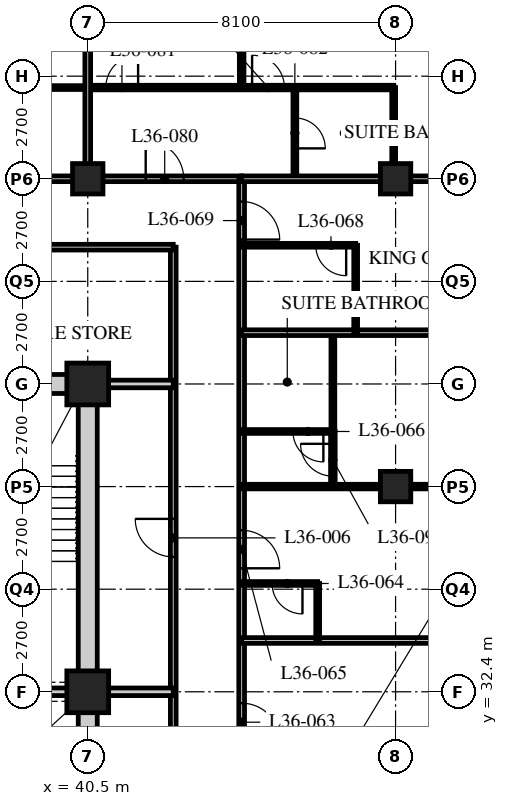
"""IFC4 building model, lengths in metres.
Left out: names, types, materials, properties, quantities, classifications, styles, units other than length and angle.
Written with IfcOpenShell. Run it as: python <this file> out.ifc"""

import sys

from ifc_helpers import new_model, si_unit, direction, frame, frame_2d, origin, origin_2d, place, context, subcontext, project, spatial, rectangle, hollow_rectangle, extrude, element, fill, save


model = new_model("IFC4")
c1 = context("Model", 3, precision=1e-05, world=origin(), true_north=direction((0.0, 1.0)))
c2 = subcontext(c1, "Body", "Model", "MODEL_VIEW")
j1 = project(units=[si_unit("LENGTHUNIT", "METRE"), si_unit("PLANEANGLEUNIT", "RADIAN")], contexts=[c1])
p1 = place(None, origin())
s1 = spatial("IfcSite", under=j1, at=p1, CompositionType="ELEMENT")
p2 = place(p1, origin())
s2 = spatial("IfcBuilding", under=s1, at=p2, CompositionType="ELEMENT")
p3 = place(p2, frame((0.0, 0.0, 140.8)))
s3 = spatial("IfcBuildingStorey", under=s2, at=p3, CompositionType="ELEMENT", Elevation=140.8)
for number, where, z_axis, x_axis in (
    (1, (40.5, 32.4, 0.0), (0.0, 0.0, 1.0), (1.0, 0.0, 0.0)),
    (2, (40.5, 40.5, 0.0), (0.0, 0.0, 1.0), (1.0, 0.0, 0.0)),
):
    element("IfcColumn", number, at=place(p3, frame(where, z_axis=z_axis, x_axis=x_axis)), inside=s3, PredefinedType="COLUMN", context=c2, shape_type="SweptSolid", body=[
        extrude(hollow_rectangle(XDim=1.1, YDim=1.1, WallThickness=0.1, at=origin_2d()), origin(), (0.0, 0.0, 1.0), 3.4),
    ])
for number, where, z_axis, x_axis in (
    (3, (40.5, 45.9, 0.0), (0.0, 0.0, 1.0), (1.0, 0.0, 0.0)),
    (4, (48.6, 37.8, 0.0), (0.0, 0.0, 1.0), (1.0, 0.0, 0.0)),
    (5, (48.6, 45.9, 0.0), (0.0, 0.0, 1.0), (1.0, 0.0, 0.0)),
):
    element("IfcColumn", number, at=place(p3, frame(where, z_axis=z_axis, x_axis=x_axis)), inside=s3, PredefinedType="COLUMN", context=c2, shape_type="SweptSolid", body=[
        extrude(hollow_rectangle(XDim=0.8, YDim=0.8, WallThickness=0.08, at=origin_2d()), origin(), (0.0, 0.0, 1.0), 3.4),
    ])
p4 = place(p3, frame((8.1, 45.9, 0.0), z_axis=(0.0, 0.0, 1.0), x_axis=(1.0, 0.0, 0.0)))
e6 = element("IfcWall", 6, at=p4, inside=s3, PredefinedType="PARTITIONING", context=c2, shape_type="SweptSolid", body=[
    extrude(rectangle(XDim=36.45, YDim=0.15, at=frame_2d((18.225, 0.0))), origin(), (0.0, 0.0, 1.0), 2.578),
])
p5 = place(p4, frame((9.625, 0.0, 0.0)))
e7 = element("IfcOpeningElement", 7, at=p5, cuts=e6, PredefinedType="OPENING", context=c2, shape_type="SweptSolid", body=[
    extrude(rectangle(XDim=1.0, YDim=2.1, at=frame_2d((0.5, 1.05))), frame((0.0, 0.085, 0.0), z_axis=(0.0, -1.0, 0.0), x_axis=(1.0, 0.0, 0.0)), (0.0, 0.0, 1.0), 0.17),
])
p6 = place(p4, frame((21.775, 0.0, 0.0)))
e8 = element("IfcOpeningElement", 8, at=p6, cuts=e6, PredefinedType="OPENING", context=c2, shape_type="SweptSolid", body=[
    extrude(rectangle(XDim=1.0, YDim=2.1, at=frame_2d((0.5, 1.05))), frame((0.0, 0.085, 0.0), z_axis=(0.0, -1.0, 0.0), x_axis=(1.0, 0.0, 0.0)), (0.0, 0.0, 1.0), 0.17),
])
p7 = place(p4, frame((28.95, 0.0, 0.0)))
e9 = element("IfcOpeningElement", 9, at=p7, cuts=e6, PredefinedType="OPENING", context=c2, shape_type="SweptSolid", body=[
    extrude(rectangle(XDim=1.0, YDim=2.1, at=frame_2d((0.5, 1.05))), frame((0.0, 0.085, 0.0), z_axis=(0.0, -1.0, 0.0), x_axis=(1.0, 0.0, 0.0)), (0.0, 0.0, 1.0), 0.17),
])
p8 = place(p4, frame((33.925, 0.0, 0.0)))
e10 = element("IfcOpeningElement", 10, at=p8, cuts=e6, PredefinedType="OPENING", context=c2, shape_type="SweptSolid", body=[
    extrude(rectangle(XDim=1.0, YDim=2.1, at=frame_2d((0.5, 1.05))), frame((0.0, 0.085, 0.0), z_axis=(0.0, -1.0, 0.0), x_axis=(1.0, 0.0, 0.0)), (0.0, 0.0, 1.0), 0.17),
])
p9 = place(p4, frame((2.625, 0.0, 0.0)))
e11 = element("IfcOpeningElement", 11, at=p9, cuts=e6, PredefinedType="OPENING", context=c2, shape_type="SweptSolid", body=[
    extrude(rectangle(XDim=1.0, YDim=2.1, at=frame_2d((0.5, 1.05))), frame((0.0, 0.085, 0.0), z_axis=(0.0, -1.0, 0.0), x_axis=(1.0, 0.0, 0.0)), (0.0, 0.0, 1.0), 0.17),
])
p10 = place(p3, frame((44.55, 17.55, 0.0), z_axis=(0.0, 0.0, 1.0), x_axis=(0.0, 1.0, 0.0)))
e12 = element("IfcWall", 12, at=p10, inside=s3, PredefinedType="PARTITIONING", context=c2, shape_type="SweptSolid", body=[
    extrude(rectangle(XDim=28.35, YDim=0.15, at=frame_2d((14.175, 0.0))), origin(), (0.0, 0.0, 1.0), 3.19),
])
p11 = place(p10, frame((2.75, 0.0, 0.0)))
e13 = element("IfcOpeningElement", 13, at=p11, cuts=e12, PredefinedType="OPENING", context=c2, shape_type="SweptSolid", body=[
    extrude(rectangle(XDim=1.0, YDim=2.1, at=frame_2d((0.5, 1.05))), frame((0.0, 0.085, 0.0), z_axis=(0.0, -1.0, 0.0), x_axis=(1.0, 0.0, 0.0)), (0.0, 0.0, 1.0), 0.17),
])
p12 = place(p10, frame((6.5, 0.0, 0.0)))
e14 = element("IfcOpeningElement", 14, at=p12, cuts=e12, PredefinedType="OPENING", context=c2, shape_type="SweptSolid", body=[
    extrude(rectangle(XDim=1.0, YDim=2.1, at=frame_2d((0.5, 1.05))), frame((0.0, 0.085, 0.0), z_axis=(0.0, -1.0, 0.0), x_axis=(1.0, 0.0, 0.0)), (0.0, 0.0, 1.0), 0.17),
])
p13 = place(p10, frame((13.55, 0.0, 0.0)))
e15 = element("IfcOpeningElement", 15, at=p13, cuts=e12, PredefinedType="OPENING", context=c2, shape_type="SweptSolid", body=[
    extrude(rectangle(XDim=1.0, YDim=2.1, at=frame_2d((0.5, 1.05))), frame((0.0, 0.085, 0.0), z_axis=(0.0, -1.0, 0.0), x_axis=(1.0, 0.0, 0.0)), (0.0, 0.0, 1.0), 0.17),
])
p14 = place(p10, frame((18.1, 0.0, 0.0)))
e16 = element("IfcOpeningElement", 16, at=p14, cuts=e12, PredefinedType="OPENING", context=c2, shape_type="SweptSolid", body=[
    extrude(rectangle(XDim=1.0, YDim=2.1, at=frame_2d((0.5, 1.05))), frame((0.0, 0.085, 0.0), z_axis=(0.0, -1.0, 0.0), x_axis=(1.0, 0.0, 0.0)), (0.0, 0.0, 1.0), 0.17),
])
p15 = place(p10, frame((26.75, 0.0, 0.0)))
e17 = element("IfcOpeningElement", 17, at=p15, cuts=e12, PredefinedType="OPENING", context=c2, shape_type="SweptSolid", body=[
    extrude(rectangle(XDim=1.0, YDim=2.1, at=frame_2d((0.5, 1.05))), frame((0.0, 0.085, 0.0), z_axis=(0.0, -1.0, 0.0), x_axis=(1.0, 0.0, 0.0)), (0.0, 0.0, 1.0), 0.17),
])
p16 = place(p3, frame((42.75, 19.35, 0.0), z_axis=(0.0, 0.0, 1.0), x_axis=(0.0, 1.0, 0.0)))
e18 = element("IfcWall", 18, at=p16, inside=s3, PredefinedType="PARTITIONING", context=c2, shape_type="SweptSolid", body=[
    extrude(rectangle(XDim=24.75, YDim=0.15, at=frame_2d((12.375, 0.0))), origin(), (0.0, 0.0, 1.0), 3.19),
])
p17 = place(p16, frame((8.5, 0.0, 0.0)))
e19 = element("IfcOpeningElement", 19, at=p17, cuts=e18, PredefinedType="OPENING", context=c2, shape_type="SweptSolid", body=[
    extrude(rectangle(XDim=1.0, YDim=2.1, at=frame_2d((0.5, 1.05))), frame((0.0, 0.085, 0.0), z_axis=(0.0, -1.0, 0.0), x_axis=(1.0, 0.0, 0.0)), (0.0, 0.0, 1.0), 0.17),
])
p18 = place(p16, frame((16.6, 0.0, 0.0)))
e20 = element("IfcOpeningElement", 20, at=p18, cuts=e18, PredefinedType="OPENING", context=c2, shape_type="SweptSolid", body=[
    extrude(rectangle(XDim=1.0, YDim=2.1, at=frame_2d((0.5, 1.05))), frame((0.0, 0.085, 0.0), z_axis=(0.0, -1.0, 0.0), x_axis=(1.0, 0.0, 0.0)), (0.0, 0.0, 1.0), 0.17),
])
p19 = place(p3, frame((42.75, 44.1, 0.0), z_axis=(0.0, 0.0, 1.0), x_axis=(-1.0, 0.0, 0.0)))
e21 = element("IfcWall", 21, at=p19, inside=s3, PredefinedType="PARTITIONING", context=c2, shape_type="SweptSolid", body=[
    extrude(rectangle(XDim=13.19, YDim=0.15, at=frame_2d((6.595, 0.0))), origin(), (0.0, 0.0, 1.0), 3.19),
])
p20 = place(p19, frame((10.2, 0.0, 0.0)))
e22 = element("IfcOpeningElement", 22, at=p20, cuts=e21, PredefinedType="OPENING", context=c2, shape_type="SweptSolid", body=[
    extrude(rectangle(XDim=1.0, YDim=2.1, at=frame_2d((0.5, 1.05))), frame((0.0, 0.085, 0.0), z_axis=(0.0, -1.0, 0.0), x_axis=(1.0, 0.0, 0.0)), (0.0, 0.0, 1.0), 0.17),
])
p21 = place(p19, frame((3.6, 0.0, 0.0)))
e23 = element("IfcOpeningElement", 23, at=p21, cuts=e21, PredefinedType="OPENING", context=c2, shape_type="SweptSolid", body=[
    extrude(rectangle(XDim=1.0, YDim=2.1, at=frame_2d((0.5, 1.05))), frame((0.0, 0.085, 0.0), z_axis=(0.0, -1.0, 0.0), x_axis=(1.0, 0.0, 0.0)), (0.0, 0.0, 1.0), 0.17),
])
for number, where, z_axis, x_axis in (
    (24, (40.5, 32.4, 0.0), (0.0, 0.0, 1.0), (1.0, 0.0, 0.0)),
    (25, (40.5, 40.5, 0.0), (0.0, 0.0, 1.0), (1.0, 0.0, 0.0)),
):
    element("IfcWall", number, at=place(p3, frame(where, z_axis=z_axis, x_axis=x_axis)), inside=s3, PredefinedType="SOLIDWALL", context=c2, shape_type="SweptSolid", body=[
        extrude(rectangle(XDim=2.25, YDim=0.2, at=frame_2d((1.125, 0.0))), origin(), (0.0, 0.0, 1.0), 3.19),
    ])
p22 = place(p3, frame((38.2, 48.3, 0.0), z_axis=(0.0, 0.0, 1.0), x_axis=(1.0, 0.0, 0.0)))
e26 = element("IfcWall", 26, at=p22, inside=s3, PredefinedType="PARTITIONING", context=c2, shape_type="SweptSolid", body=[
    extrude(rectangle(XDim=2.3, YDim=0.1, at=frame_2d((1.15, 0.0))), origin(), (0.0, 0.0, 1.0), 3.19),
])
p23 = place(p3, frame((44.55, 33.75, 0.0), z_axis=(0.0, 0.0, 1.0), x_axis=(1.0, 0.0, 0.0)))
e27 = element("IfcWall", 27, at=p23, inside=s3, PredefinedType="PARTITIONING", context=c2, shape_type="SweptSolid", body=[
    extrude(rectangle(XDim=11.85, YDim=0.15, at=frame_2d((5.925, 0.0))), origin(), (0.0, 0.0, 1.0), 3.19),
])
p24 = place(p3, frame((46.55, 33.75, 0.0), z_axis=(0.0, 0.0, 1.0), x_axis=(0.0, 1.0, 0.0)))
e28 = element("IfcWall", 28, at=p24, inside=s3, PredefinedType="PARTITIONING", context=c2, shape_type="SweptSolid", body=[
    extrude(rectangle(XDim=1.5, YDim=0.1, at=frame_2d((0.75, 0.0))), origin(), (0.0, 0.0, 1.0), 3.19),
])
p25 = place(p3, frame((44.55, 35.25, 0.0), z_axis=(0.0, 0.0, 1.0), x_axis=(1.0, 0.0, 0.0)))
e29 = element("IfcWall", 29, at=p25, inside=s3, PredefinedType="PARTITIONING", context=c2, shape_type="SweptSolid", body=[
    extrude(rectangle(XDim=2.0, YDim=0.1, at=frame_2d((1.0, 0.0))), origin(), (0.0, 0.0, 1.0), 3.19),
])
p26 = place(p25, frame((0.8, 0.0, 0.0)))
e30 = element("IfcOpeningElement", 30, at=p26, cuts=e29, PredefinedType="OPENING", context=c2, shape_type="SweptSolid", body=[
    extrude(rectangle(XDim=0.8, YDim=2.1, at=frame_2d((0.4, 1.05))), frame((0.0, 0.06, 0.0), z_axis=(0.0, -1.0, 0.0), x_axis=(1.0, 0.0, 0.0)), (0.0, 0.0, 1.0), 0.12),
])
p27 = place(p3, frame((46.95, 39.25, 0.0), z_axis=(0.0, 0.0, 1.0), x_axis=(0.0, 1.0, 0.0)))
e31 = element("IfcWall", 31, at=p27, inside=s3, PredefinedType="PARTITIONING", context=c2, shape_type="SweptSolid", body=[
    extrude(rectangle(XDim=2.6, YDim=0.1, at=frame_2d((1.3, 0.0))), origin(), (0.0, 0.0, 1.0), 3.19),
])
p28 = place(p3, frame((44.55, 39.25, 0.0), z_axis=(0.0, 0.0, 1.0), x_axis=(1.0, 0.0, 0.0)))
e32 = element("IfcWall", 32, at=p28, inside=s3, PredefinedType="PARTITIONING", context=c2, shape_type="SweptSolid", body=[
    extrude(rectangle(XDim=2.4, YDim=0.1, at=frame_2d((1.2, 0.0))), origin(), (0.0, 0.0, 1.0), 3.19),
])
p29 = place(p28, frame((1.35, 0.0, 0.0)))
e33 = element("IfcOpeningElement", 33, at=p29, cuts=e32, PredefinedType="OPENING", context=c2, shape_type="SweptSolid", body=[
    extrude(rectangle(XDim=0.8, YDim=2.1, at=frame_2d((0.4, 1.05))), frame((0.0, 0.06, 0.0), z_axis=(0.0, -1.0, 0.0), x_axis=(1.0, 0.0, 0.0)), (0.0, 0.0, 1.0), 0.12),
])
p30 = place(p3, frame((44.55, 37.8, 0.0), z_axis=(0.0, 0.0, 1.0), x_axis=(1.0, 0.0, 0.0)))
e34 = element("IfcWall", 34, at=p30, inside=s3, PredefinedType="PARTITIONING", context=c2, shape_type="SweptSolid", body=[
    extrude(rectangle(XDim=11.85, YDim=0.12, at=frame_2d((5.925, 0.0))), origin(), (0.0, 0.0, 1.0), 2.578),
])
p31 = place(p30, frame((6.85, 0.0, 0.0)))
e35 = element("IfcOpeningElement", 35, at=p31, cuts=e34, PredefinedType="OPENING", context=c2, shape_type="SweptSolid", body=[
    extrude(rectangle(XDim=0.85, YDim=2.1, at=frame_2d((0.425, 1.05))), frame((0.0, 0.07, 0.0), z_axis=(0.0, -1.0, 0.0), x_axis=(1.0, 0.0, 0.0)), (0.0, 0.0, 1.0), 0.14),
])
p32 = place(p3, frame((44.55, 41.85, 0.0), z_axis=(0.0, 0.0, 1.0), x_axis=(1.0, 0.0, 0.0)))
e36 = element("IfcWall", 36, at=p32, inside=s3, PredefinedType="PARTITIONING", context=c2, shape_type="SweptSolid", body=[
    extrude(rectangle(XDim=11.85, YDim=0.15, at=frame_2d((5.925, 0.0))), origin(), (0.0, 0.0, 1.0), 3.19),
])
p33 = place(p3, frame((47.55, 41.85, 0.0), z_axis=(0.0, 0.0, 1.0), x_axis=(0.0, 1.0, 0.0)))
e37 = element("IfcWall", 37, at=p33, inside=s3, PredefinedType="PARTITIONING", context=c2, shape_type="SweptSolid", body=[
    extrude(rectangle(XDim=2.3, YDim=0.1, at=frame_2d((1.15, 0.0))), origin(), (0.0, 0.0, 1.0), 3.19),
])
p34 = place(p3, frame((44.55, 44.15, 0.0), z_axis=(0.0, 0.0, 1.0), x_axis=(1.0, 0.0, 0.0)))
e38 = element("IfcWall", 38, at=p34, inside=s3, PredefinedType="PARTITIONING", context=c2, shape_type="SweptSolid", body=[
    extrude(rectangle(XDim=3.0, YDim=0.1, at=frame_2d((1.5, 0.0))), origin(), (0.0, 0.0, 1.0), 3.19),
])
p35 = place(p34, frame((1.95, 0.0, 0.0)))
e39 = element("IfcOpeningElement", 39, at=p35, cuts=e38, PredefinedType="OPENING", context=c2, shape_type="SweptSolid", body=[
    extrude(rectangle(XDim=0.8, YDim=2.1, at=frame_2d((0.4, 1.05))), frame((0.0, 0.06, 0.0), z_axis=(0.0, -1.0, 0.0), x_axis=(1.0, 0.0, 0.0)), (0.0, 0.0, 1.0), 0.12),
])
p36 = place(p3, frame((40.5, 48.3, 0.0), z_axis=(0.0, 0.0, 1.0), x_axis=(1.0, 0.0, 0.0)))
e40 = element("IfcWall", 40, at=p36, inside=s3, PredefinedType="PARTITIONING", context=c2, shape_type="SweptSolid", body=[
    extrude(rectangle(XDim=8.05, YDim=0.12, at=frame_2d((4.025, 0.0))), origin(), (0.0, 0.0, 1.0), 3.19),
])
p37 = place(p36, frame((0.475, 0.0, 0.0)))
e41 = element("IfcOpeningElement", 41, at=p37, cuts=e40, PredefinedType="OPENING", context=c2, shape_type="SweptSolid", body=[
    extrude(rectangle(XDim=0.85, YDim=2.1, at=frame_2d((0.425, 1.05))), frame((0.0, 0.07, 0.0), z_axis=(0.0, -1.0, 0.0), x_axis=(1.0, 0.0, 0.0)), (0.0, 0.0, 1.0), 0.14),
])
p38 = place(p36, frame((4.325, 0.0, 0.0)))
e42 = element("IfcOpeningElement", 42, at=p38, cuts=e40, PredefinedType="OPENING", context=c2, shape_type="SweptSolid", body=[
    extrude(rectangle(XDim=0.85, YDim=2.1, at=frame_2d((0.425, 1.05))), frame((0.0, 0.07, 0.0), z_axis=(0.0, -1.0, 0.0), x_axis=(1.0, 0.0, 0.0)), (0.0, 0.0, 1.0), 0.14),
])
p39 = place(p3, frame((45.95, 45.9, 0.0), z_axis=(0.0, 0.0, 1.0), x_axis=(0.0, 1.0, 0.0)))
e43 = element("IfcWall", 43, at=p39, inside=s3, PredefinedType="PARTITIONING", context=c2, shape_type="SweptSolid", body=[
    extrude(rectangle(XDim=2.4, YDim=0.1, at=frame_2d((1.2, 0.0))), origin(), (0.0, 0.0, 1.0), 3.19),
])
p40 = place(p39, frame((0.8, 0.0, 0.0)))
e44 = element("IfcOpeningElement", 44, at=p40, cuts=e43, PredefinedType="OPENING", context=c2, shape_type="SweptSolid", body=[
    extrude(rectangle(XDim=0.8, YDim=2.1, at=frame_2d((0.4, 1.05))), frame((0.0, 0.06, 0.0), z_axis=(0.0, -1.0, 0.0), x_axis=(1.0, 0.0, 0.0)), (0.0, 0.0, 1.0), 0.12),
])
p41 = place(p3, frame((48.55, 45.9, 0.0), z_axis=(0.0, 0.0, 1.0), x_axis=(0.0, 1.0, 0.0)))
e45 = element("IfcWall", 45, at=p41, inside=s3, PredefinedType="PARTITIONING", context=c2, shape_type="SweptSolid", body=[
    extrude(rectangle(XDim=2.4, YDim=0.1, at=frame_2d((1.2, 0.0))), origin(), (0.0, 0.0, 1.0), 2.578),
])
p42 = place(p3, frame((44.55, 48.3, 0.0), z_axis=(0.0, 0.0, 1.0), x_axis=(0.0, 1.0, 0.0)))
e46 = element("IfcWall", 46, at=p42, inside=s3, PredefinedType="PARTITIONING", context=c2, shape_type="SweptSolid", body=[
    extrude(rectangle(XDim=5.4, YDim=0.12, at=frame_2d((2.7, 0.0))), origin(), (0.0, 0.0, 1.0), 3.19),
])
for number, where, z_axis, x_axis in (
    (47, (44.55, 45.9, 0.0), (0.0, 0.0, 1.0), (1.0, 0.0, 0.0)),
    (48, (40.5, 45.9, 0.0), (0.0, 0.0, 1.0), (0.0, 1.0, 0.0)),
):
    element("IfcWall", number, at=place(p3, frame(where, z_axis=z_axis, x_axis=x_axis)), inside=s3, PredefinedType="PARTITIONING", context=c2, shape_type="SweptSolid", body=[
        extrude(rectangle(XDim=7.8, YDim=0.15, at=frame_2d((3.9, 0.0))), origin(), (0.0, 0.0, 1.0), 2.578),
    ])
p43 = place(p3, frame((46.95, 39.26, 0.0), z_axis=(0.0, 0.0, 1.0), x_axis=(0.0, -1.0, 0.0)))
e49 = element("IfcWall", 49, at=p43, inside=s3, PredefinedType="PARTITIONING", context=c2, shape_type="SweptSolid", body=[
    extrude(rectangle(XDim=1.46, YDim=0.12, at=frame_2d((0.73, 0.0))), origin(), (0.0, 0.0, 1.0), 3.19),
])
p44 = place(p43, frame((0.335, 0.0, 0.0)))
e50 = element("IfcOpeningElement", 50, at=p44, cuts=e49, PredefinedType="OPENING", context=c2, shape_type="SweptSolid", body=[
    extrude(rectangle(XDim=0.85, YDim=2.1, at=frame_2d((0.425, 1.05))), frame((0.0, 0.07, 0.0), z_axis=(0.0, -1.0, 0.0), x_axis=(1.0, 0.0, 0.0)), (0.0, 0.0, 1.0), 0.14),
])
p45 = place(p3, frame((15.95, 40.5, 0.0), z_axis=(0.0, 0.0, 1.0), x_axis=(1.0, 0.0, 0.0)))
e51 = element("IfcWall", 51, at=p45, inside=s3, PredefinedType="SOLIDWALL", context=c2, shape_type="SweptSolid", body=[
    extrude(rectangle(XDim=24.8, YDim=0.5, at=frame_2d((12.4, 0.0))), origin(), (0.0, 0.0, 1.0), 2.54),
])
p46 = place(p45, frame((11.5, 0.0, 0.0)))
e52 = element("IfcOpeningElement", 52, at=p46, cuts=e51, PredefinedType="OPENING", context=c2, shape_type="SweptSolid", body=[
    extrude(rectangle(XDim=1.8, YDim=2.4, at=frame_2d((0.9, 1.2))), frame((0.0, 0.26, 0.0), z_axis=(0.0, -1.0, 0.0), x_axis=(1.0, 0.0, 0.0)), (0.0, 0.0, 1.0), 0.52),
])
p47 = place(p3, frame((40.5, 24.55, 0.0), z_axis=(0.0, 0.0, 1.0), x_axis=(0.0, 1.0, 0.0)))
e53 = element("IfcWall", 53, at=p47, inside=s3, PredefinedType="SOLIDWALL", context=c2, shape_type="SweptSolid", body=[
    extrude(rectangle(XDim=15.7, YDim=0.5, at=frame_2d((7.85, 0.0))), origin(), (0.0, 0.0, 1.0), 2.578),
])
p48 = place(p3, frame((32.3, 32.4, 0.0), z_axis=(0.0, 0.0, 1.0), x_axis=(1.0, 0.0, 0.0)))
e54 = element("IfcWall", 54, at=p48, inside=s3, PredefinedType="SOLIDWALL", context=c2, shape_type="SweptSolid", body=[
    extrude(rectangle(XDim=7.95, YDim=0.2, at=frame_2d((3.975, 0.0))), origin(), (0.0, 0.0, 1.0), 2.578),
])
p49 = place(p18, origin())
e55 = element("IfcDoor", 55, at=p49, inside=s3, OperationType="SINGLE_SWING_RIGHT", PredefinedType="DOOR", context=c2, shape_type="SweptSolid", body=[
    extrude(rectangle(XDim=1.0, YDim=2.1, at=frame_2d((0.5, 1.05))), frame((0.0, 0.025, 0.0), z_axis=(0.0, -1.0, 0.0), x_axis=(1.0, 0.0, 0.0)), (0.0, 0.0, 1.0), 0.05),
])
fill(e20, e55)
p50 = place(p13, origin())
e56 = element("IfcDoor", 56, at=p50, inside=s3, OperationType="SINGLE_SWING_RIGHT", PredefinedType="DOOR", context=c2, shape_type="SweptSolid", body=[
    extrude(rectangle(XDim=1.0, YDim=2.1, at=frame_2d((0.5, 1.05))), frame((0.0, 0.025, 0.0), z_axis=(0.0, -1.0, 0.0), x_axis=(1.0, 0.0, 0.0)), (0.0, 0.0, 1.0), 0.05),
])
fill(e15, e56)
p51 = place(p26, origin())
e57 = element("IfcDoor", 57, at=p51, inside=s3, OperationType="SINGLE_SWING_LEFT", PredefinedType="DOOR", context=c2, shape_type="SweptSolid", body=[
    extrude(rectangle(XDim=0.8, YDim=2.1, at=frame_2d((0.4, 1.05))), frame((0.0, 0.025, 0.0), z_axis=(0.0, -1.0, 0.0), x_axis=(1.0, 0.0, 0.0)), (0.0, 0.0, 1.0), 0.05),
])
fill(e30, e57)
p52 = place(p14, origin())
e58 = element("IfcDoor", 58, at=p52, inside=s3, OperationType="SINGLE_SWING_RIGHT", PredefinedType="DOOR", context=c2, shape_type="SweptSolid", body=[
    extrude(rectangle(XDim=1.0, YDim=2.1, at=frame_2d((0.5, 1.05))), frame((0.0, 0.025, 0.0), z_axis=(0.0, -1.0, 0.0), x_axis=(1.0, 0.0, 0.0)), (0.0, 0.0, 1.0), 0.05),
])
fill(e16, e58)
p53 = place(p29, origin())
e59 = element("IfcDoor", 59, at=p53, inside=s3, OperationType="SINGLE_SWING_LEFT", PredefinedType="DOOR", context=c2, shape_type="SweptSolid", body=[
    extrude(rectangle(XDim=0.8, YDim=2.1, at=frame_2d((0.4, 1.05))), frame((0.0, 0.025, 0.0), z_axis=(0.0, -1.0, 0.0), x_axis=(1.0, 0.0, 0.0)), (0.0, 0.0, 1.0), 0.05),
])
fill(e33, e59)
p54 = place(p35, origin())
e60 = element("IfcDoor", 60, at=p54, inside=s3, OperationType="SINGLE_SWING_LEFT", PredefinedType="DOOR", context=c2, shape_type="SweptSolid", body=[
    extrude(rectangle(XDim=0.8, YDim=2.1, at=frame_2d((0.4, 1.05))), frame((0.0, 0.025, 0.0), z_axis=(0.0, -1.0, 0.0), x_axis=(1.0, 0.0, 0.0)), (0.0, 0.0, 1.0), 0.05),
])
fill(e39, e60)
p55 = place(p15, origin())
e61 = element("IfcDoor", 61, at=p55, inside=s3, OperationType="SINGLE_SWING_RIGHT", PredefinedType="DOOR", context=c2, shape_type="SweptSolid", body=[
    extrude(rectangle(XDim=1.0, YDim=2.1, at=frame_2d((0.5, 1.05))), frame((0.0, 0.025, 0.0), z_axis=(0.0, -1.0, 0.0), x_axis=(1.0, 0.0, 0.0)), (0.0, 0.0, 1.0), 0.05),
])
fill(e17, e61)
p56 = place(p8, origin())
e62 = element("IfcDoor", 62, at=p56, inside=s3, OperationType="SINGLE_SWING_LEFT", PredefinedType="DOOR", context=c2, shape_type="SweptSolid", body=[
    extrude(rectangle(XDim=1.0, YDim=2.1, at=frame_2d((0.5, 1.05))), frame((0.0, 0.025, 0.0), z_axis=(0.0, -1.0, 0.0), x_axis=(1.0, 0.0, 0.0)), (0.0, 0.0, 1.0), 0.05),
])
fill(e10, e62)
p57 = place(p37, origin())
e63 = element("IfcDoor", 63, at=p57, inside=s3, OperationType="SINGLE_SWING_RIGHT", PredefinedType="DOOR", context=c2, shape_type="SweptSolid", body=[
    extrude(rectangle(XDim=0.85, YDim=2.1, at=frame_2d((0.425, 1.05))), frame((0.0, 0.025, 0.0), z_axis=(0.0, -1.0, 0.0), x_axis=(1.0, 0.0, 0.0)), (0.0, 0.0, 1.0), 0.05),
])
fill(e41, e63)
p58 = place(p40, origin())
e64 = element("IfcDoor", 64, at=p58, inside=s3, OperationType="SINGLE_SWING_RIGHT", PredefinedType="DOOR", context=c2, shape_type="SweptSolid", body=[
    extrude(rectangle(XDim=0.8, YDim=2.1, at=frame_2d((0.4, 1.05))), frame((0.0, 0.025, 0.0), z_axis=(0.0, -1.0, 0.0), x_axis=(1.0, 0.0, 0.0)), (0.0, 0.0, 1.0), 0.05),
])
fill(e44, e64)
p59 = place(p38, origin())
e65 = element("IfcDoor", 65, at=p59, inside=s3, OperationType="SINGLE_SWING_LEFT", PredefinedType="DOOR", context=c2, shape_type="SweptSolid", body=[
    extrude(rectangle(XDim=0.85, YDim=2.1, at=frame_2d((0.425, 1.05))), frame((0.0, 0.025, 0.0), z_axis=(0.0, -1.0, 0.0), x_axis=(1.0, 0.0, 0.0)), (0.0, 0.0, 1.0), 0.05),
])
fill(e42, e65)
p60 = place(p44, origin())
e66 = element("IfcDoor", 66, at=p60, inside=s3, OperationType="SINGLE_SWING_RIGHT", PredefinedType="DOOR", context=c2, shape_type="SweptSolid", body=[
    extrude(rectangle(XDim=0.85, YDim=2.1, at=frame_2d((0.425, 1.05))), frame((0.0, 0.025, 0.0), z_axis=(0.0, -1.0, 0.0), x_axis=(1.0, 0.0, 0.0)), (0.0, 0.0, 1.0), 0.05),
])
fill(e50, e66)
save(model, sys.argv[1])
